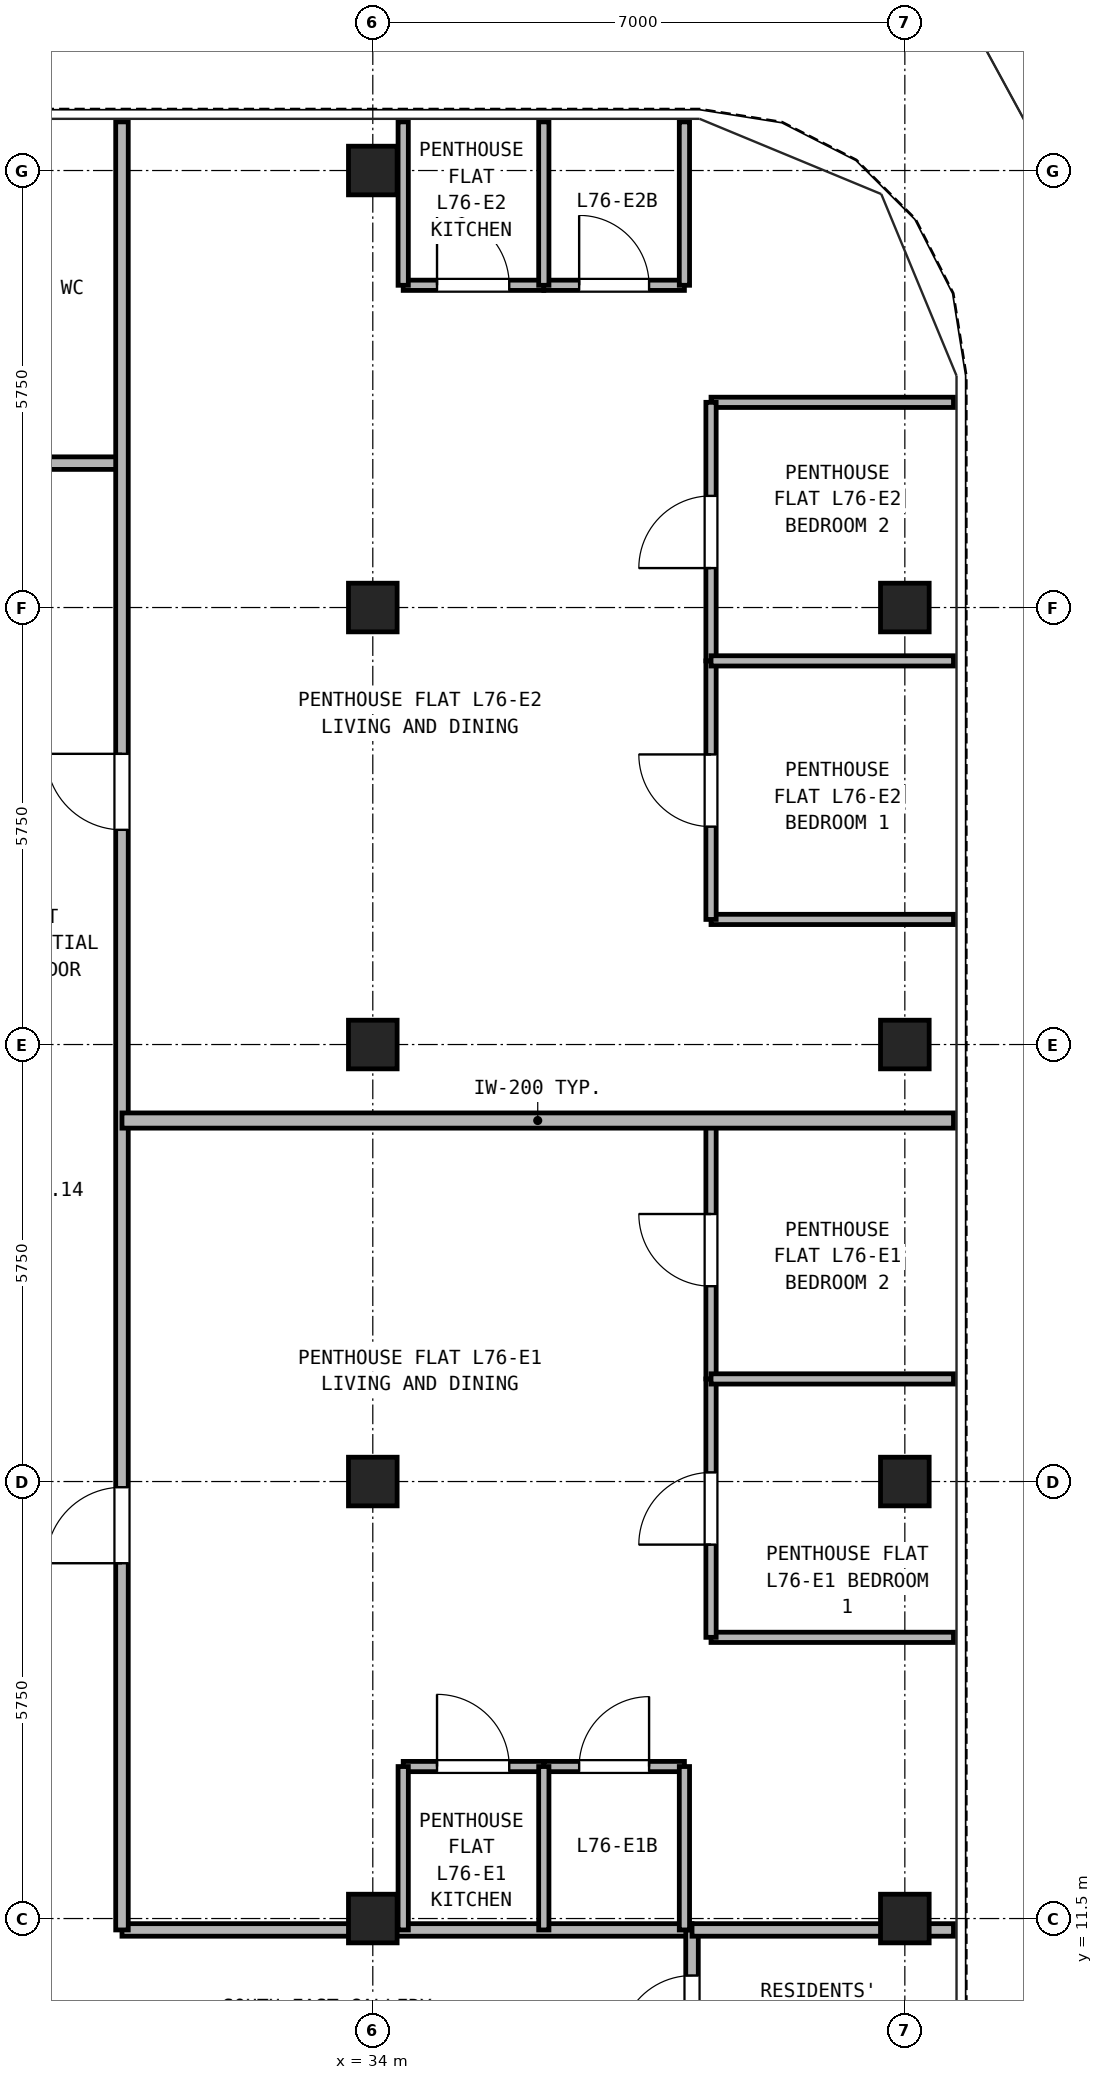
"""IFC4 building model, lengths in metres.
Left out: names, types, materials, properties, quantities, classifications, styles, units other than length and angle.
Written with IfcOpenShell. Run it as: python <this file> out.ifc"""

import sys

from ifc_helpers import new_model, si_unit, direction, frame, frame_2d, origin, origin_2d, place, context, subcontext, project, spatial, rectangle, hollow_rectangle, extrude, source, transform, mapped, element, fill, save


model = new_model("IFC4")
c1 = context("Model", 3, precision=1e-05, world=origin(), true_north=direction((0.0, 1.0)))
c2 = subcontext(c1, "Body", "Model", "MODEL_VIEW")
j1 = project(units=[si_unit("LENGTHUNIT", "METRE"), si_unit("PLANEANGLEUNIT", "RADIAN")], contexts=[c1])
p1 = place(None, origin())
s1 = spatial("IfcSite", under=j1, at=p1, CompositionType="ELEMENT")
p2 = place(p1, origin())
s2 = spatial("IfcBuilding", under=s1, at=p2, CompositionType="ELEMENT")
p3 = place(p2, frame((0.0, 0.0, 264.9)))
s3 = spatial("IfcBuildingStorey", under=s2, at=p3, CompositionType="ELEMENT", Elevation=264.9)
m1 = source(origin(), c2, "Body", "SweptSolid", [
    extrude(hollow_rectangle(XDim=0.64, YDim=0.64, WallThickness=0.035, at=origin_2d()), origin(), (0.0, 0.0, 1.0), 2.98),
])
for number, where, z_axis, x_axis in (
    (1, (34.0, 34.5, 0.0), (0.0, 0.0, 1.0), (1.0, 0.0, 0.0)),
    (2, (41.0, 11.5, 0.0), (0.0, 0.0, 1.0), (1.0, 0.0, 0.0)),
    (3, (41.0, 17.25, 0.0), (0.0, 0.0, 1.0), (1.0, 0.0, 0.0)),
    (4, (41.0, 23.0, 0.0), (0.0, 0.0, 1.0), (1.0, 0.0, 0.0)),
    (5, (41.0, 28.75, 0.0), (0.0, 0.0, 1.0), (1.0, 0.0, 0.0)),
    (6, (34.0, 11.5, 0.0), (0.0, 0.0, 1.0), (1.0, 0.0, 0.0)),
    (7, (34.0, 17.25, 0.0), (0.0, 0.0, 1.0), (1.0, 0.0, 0.0)),
    (8, (34.0, 23.0, 0.0), (0.0, 0.0, 1.0), (1.0, 0.0, 0.0)),
    (9, (34.0, 28.75, 0.0), (0.0, 0.0, 1.0), (1.0, 0.0, 0.0)),
):
    element("IfcColumn", number, at=place(p3, frame(where, z_axis=z_axis, x_axis=x_axis)), inside=s3, PredefinedType="COLUMN", context=c2, shape_type="MappedRepresentation", body=[
        mapped(m1, transform((0.0, 0.0, 0.0), x_axis=(1.0, 0.0, 0.0), y_axis=(0.0, 1.0, 0.0), z_axis=(0.0, 0.0, 1.0), scale=1.0)),
    ])
p4 = place(p3, frame((30.7, 11.35, 0.0), z_axis=(0.0, 0.0, 1.0), x_axis=(1.0, 0.0, 0.0)))
e10 = element("IfcWall", 10, at=p4, inside=s3, PredefinedType="PARTITIONING", context=c2, shape_type="SweptSolid", body=[
    extrude(rectangle(XDim=7.5, YDim=0.165, at=frame_2d((3.75, 0.0))), origin(), (0.0, 0.0, 1.0), 2.428),
])
p5 = place(p3, frame((38.2, 9.35, 0.0), z_axis=(0.0, 0.0, 1.0), x_axis=(0.0, 1.0, 0.0)))
e11 = element("IfcWall", 11, at=p5, inside=s3, PredefinedType="PARTITIONING", context=c2, shape_type="SweptSolid", body=[
    extrude(rectangle(XDim=2.0, YDim=0.165, at=frame_2d((1.0, 0.0))), origin(), (0.0, 0.0, 1.0), 2.98),
])
p6 = place(p5, frame((0.45, 0.0, 0.0)))
e12 = element("IfcOpeningElement", 12, at=p6, cuts=e11, PredefinedType="OPENING", context=c2, shape_type="SweptSolid", body=[
    extrude(rectangle(XDim=0.95, YDim=2.15, at=frame_2d((0.475, 1.075))), frame((0.0, 0.093, 0.0), z_axis=(0.0, -1.0, 0.0), x_axis=(1.0, 0.0, 0.0)), (0.0, 0.0, 1.0), 0.185),
])
p7 = place(p3, frame((16.3, 30.65, 0.0), z_axis=(0.0, 0.0, 1.0), x_axis=(1.0, 0.0, 0.0)))
e13 = element("IfcWall", 13, at=p7, inside=s3, PredefinedType="PARTITIONING", context=c2, shape_type="SweptSolid", body=[
    extrude(rectangle(XDim=14.4, YDim=0.165, at=frame_2d((7.2, 0.0))), origin(), (0.0, 0.0, 1.0), 2.98),
])
p8 = place(p7, frame((3.1, 0.0, 0.0)))
e14 = element("IfcOpeningElement", 14, at=p8, cuts=e13, PredefinedType="OPENING", context=c2, shape_type="SweptSolid", body=[
    extrude(rectangle(XDim=0.95, YDim=2.15, at=frame_2d((0.475, 1.075))), frame((0.0, 0.093, 0.0), z_axis=(0.0, -1.0, 0.0), x_axis=(1.0, 0.0, 0.0)), (0.0, 0.0, 1.0), 0.185),
])
p9 = place(p7, frame((8.0, 0.0, 0.0)))
e15 = element("IfcOpeningElement", 15, at=p9, cuts=e13, PredefinedType="OPENING", context=c2, shape_type="SweptSolid", body=[
    extrude(rectangle(XDim=0.95, YDim=2.15, at=frame_2d((0.475, 1.075))), frame((0.0, 0.093, 0.0), z_axis=(0.0, -1.0, 0.0), x_axis=(1.0, 0.0, 0.0)), (0.0, 0.0, 1.0), 0.185),
])
p10 = place(p7, frame((11.6, 0.0, 0.0)))
e16 = element("IfcOpeningElement", 16, at=p10, cuts=e13, PredefinedType="OPENING", context=c2, shape_type="SweptSolid", body=[
    extrude(rectangle(XDim=0.92, YDim=2.1, at=frame_2d((0.46, 1.05))), frame((0.0, 0.093, 0.0), z_axis=(0.0, -1.0, 0.0), x_axis=(1.0, 0.0, 0.0)), (0.0, 0.0, 1.0), 0.185),
])
p11 = place(p3, frame((30.7, 11.35, 0.0), z_axis=(0.0, 0.0, 1.0), x_axis=(0.0, 1.0, 0.0)))
e17 = element("IfcWall", 17, at=p11, inside=s3, PredefinedType="PARTITIONING", context=c2, shape_type="SweptSolid", body=[
    extrude(rectangle(XDim=23.79, YDim=0.165, at=frame_2d((11.895, 0.0))), origin(), (0.0, 0.0, 1.0), 2.98),
])
p12 = place(p11, frame((4.825, 0.0, 0.0)))
e18 = element("IfcOpeningElement", 18, at=p12, cuts=e17, PredefinedType="OPENING", context=c2, shape_type="SweptSolid", body=[
    extrude(rectangle(XDim=1.0, YDim=2.15, at=frame_2d((0.5, 1.075))), frame((0.0, 0.093, 0.0), z_axis=(0.0, -1.0, 0.0), x_axis=(1.0, 0.0, 0.0)), (0.0, 0.0, 1.0), 0.185),
])
p13 = place(p11, frame((14.475, 0.0, 0.0)))
e19 = element("IfcOpeningElement", 19, at=p13, cuts=e17, PredefinedType="OPENING", context=c2, shape_type="SweptSolid", body=[
    extrude(rectangle(XDim=1.0, YDim=2.15, at=frame_2d((0.5, 1.075))), frame((0.0, 0.093, 0.0), z_axis=(0.0, -1.0, 0.0), x_axis=(1.0, 0.0, 0.0)), (0.0, 0.0, 1.0), 0.185),
])
p14 = place(p3, frame((38.2, 11.35, 0.0), z_axis=(0.0, 0.0, 1.0), x_axis=(1.0, 0.0, 0.0)))
e20 = element("IfcWall", 20, at=p14, inside=s3, PredefinedType="PARTITIONING", context=c2, shape_type="SweptSolid", body=[
    extrude(rectangle(XDim=3.44, YDim=0.165, at=frame_2d((1.72, 0.0))), origin(), (0.0, 0.0, 1.0), 2.428),
])
p15 = place(p3, frame((34.4, 13.5, 0.0), z_axis=(0.0, 0.0, 1.0), x_axis=(1.0, 0.0, 0.0)))
e21 = element("IfcWall", 21, at=p15, inside=s3, PredefinedType="PARTITIONING", context=c2, shape_type="SweptSolid", body=[
    extrude(rectangle(XDim=1.85, YDim=0.135, at=frame_2d((0.925, 0.0))), origin(), (0.0, 0.0, 1.0), 2.98),
])
p16 = place(p15, frame((0.445, 0.0, 0.0)))
e22 = element("IfcOpeningElement", 22, at=p16, cuts=e21, PredefinedType="OPENING", context=c2, shape_type="SweptSolid", body=[
    extrude(rectangle(XDim=0.95, YDim=2.15, at=frame_2d((0.475, 1.075))), frame((0.0, 0.077, 0.0), z_axis=(0.0, -1.0, 0.0), x_axis=(1.0, 0.0, 0.0)), (0.0, 0.0, 1.0), 0.155),
])
p17 = place(p3, frame((36.25, 13.5, 0.0), z_axis=(0.0, 0.0, 1.0), x_axis=(1.0, 0.0, 0.0)))
e23 = element("IfcWall", 23, at=p17, inside=s3, PredefinedType="PARTITIONING", context=c2, shape_type="SweptSolid", body=[
    extrude(rectangle(XDim=1.85, YDim=0.135, at=frame_2d((0.925, 0.0))), origin(), (0.0, 0.0, 1.0), 2.98),
])
p18 = place(p17, frame((0.465, 0.0, 0.0)))
e24 = element("IfcOpeningElement", 24, at=p18, cuts=e23, PredefinedType="OPENING", context=c2, shape_type="SweptSolid", body=[
    extrude(rectangle(XDim=0.92, YDim=2.1, at=frame_2d((0.46, 1.05))), frame((0.0, 0.077, 0.0), z_axis=(0.0, -1.0, 0.0), x_axis=(1.0, 0.0, 0.0)), (0.0, 0.0, 1.0), 0.155),
])
for number, where, z_axis, x_axis in (
    (25, (34.4, 11.35, 0.0), (0.0, 0.0, 1.0), (0.0, 1.0, 0.0)),
    (26, (36.25, 11.35, 0.0), (0.0, 0.0, 1.0), (0.0, 1.0, 0.0)),
    (27, (38.1, 11.35, 0.0), (0.0, 0.0, 1.0), (0.0, 1.0, 0.0)),
):
    element("IfcWall", number, at=place(p3, frame(where, z_axis=z_axis, x_axis=x_axis)), inside=s3, PredefinedType="PARTITIONING", context=c2, shape_type="SweptSolid", body=[
        extrude(rectangle(XDim=2.15, YDim=0.135, at=frame_2d((1.075, 0.0))), origin(), (0.0, 0.0, 1.0), 2.98),
    ])
p19 = place(p3, frame((38.45, 15.2, 0.0), z_axis=(0.0, 0.0, 1.0), x_axis=(1.0, 0.0, 0.0)))
e28 = element("IfcWall", 28, at=p19, inside=s3, PredefinedType="PARTITIONING", context=c2, shape_type="SweptSolid", body=[
    extrude(rectangle(XDim=3.19, YDim=0.135, at=frame_2d((1.595, 0.0))), origin(), (0.0, 0.0, 1.0), 2.98),
])
p20 = place(p3, frame((38.45, 15.2, 0.0), z_axis=(0.0, 0.0, 1.0), x_axis=(0.0, 1.0, 0.0)))
e29 = element("IfcWall", 29, at=p20, inside=s3, PredefinedType="PARTITIONING", context=c2, shape_type="SweptSolid", body=[
    extrude(rectangle(XDim=3.4, YDim=0.135, at=frame_2d((1.7, 0.0))), origin(), (0.0, 0.0, 1.0), 2.98),
])
p21 = place(p20, frame((1.22, 0.0, 0.0)))
e30 = element("IfcOpeningElement", 30, at=p21, cuts=e29, PredefinedType="OPENING", context=c2, shape_type="SweptSolid", body=[
    extrude(rectangle(XDim=0.95, YDim=2.15, at=frame_2d((0.475, 1.075))), frame((0.0, 0.077, 0.0), z_axis=(0.0, -1.0, 0.0), x_axis=(1.0, 0.0, 0.0)), (0.0, 0.0, 1.0), 0.155),
])
p22 = place(p3, frame((38.45, 18.6, 0.0), z_axis=(0.0, 0.0, 1.0), x_axis=(0.0, 1.0, 0.0)))
e31 = element("IfcWall", 31, at=p22, inside=s3, PredefinedType="PARTITIONING", context=c2, shape_type="SweptSolid", body=[
    extrude(rectangle(XDim=3.4, YDim=0.135, at=frame_2d((1.7, 0.0))), origin(), (0.0, 0.0, 1.0), 2.98),
])
p23 = place(p22, frame((1.22, 0.0, 0.0)))
e32 = element("IfcOpeningElement", 32, at=p23, cuts=e31, PredefinedType="OPENING", context=c2, shape_type="SweptSolid", body=[
    extrude(rectangle(XDim=0.95, YDim=2.15, at=frame_2d((0.475, 1.075))), frame((0.0, 0.077, 0.0), z_axis=(0.0, -1.0, 0.0), x_axis=(1.0, 0.0, 0.0)), (0.0, 0.0, 1.0), 0.155),
])
p24 = place(p3, frame((38.45, 18.6, 0.0), z_axis=(0.0, 0.0, 1.0), x_axis=(1.0, 0.0, 0.0)))
e33 = element("IfcWall", 33, at=p24, inside=s3, PredefinedType="PARTITIONING", context=c2, shape_type="SweptSolid", body=[
    extrude(rectangle(XDim=3.19, YDim=0.135, at=frame_2d((1.595, 0.0))), origin(), (0.0, 0.0, 1.0), 2.98),
])
p25 = place(p3, frame((30.7, 22.0, 0.0), z_axis=(0.0, 0.0, 1.0), x_axis=(1.0, 0.0, 0.0)))
e34 = element("IfcWall", 34, at=p25, inside=s3, PredefinedType="PARTITIONING", context=c2, shape_type="SweptSolid", body=[
    extrude(rectangle(XDim=10.94, YDim=0.2, at=frame_2d((5.47, 0.0))), origin(), (0.0, 0.0, 1.0), 2.98),
])
p26 = place(p3, frame((34.4, 32.99, 0.0), z_axis=(0.0, 0.0, 1.0), x_axis=(1.0, 0.0, 0.0)))
e35 = element("IfcWall", 35, at=p26, inside=s3, PredefinedType="PARTITIONING", context=c2, shape_type="SweptSolid", body=[
    extrude(rectangle(XDim=1.85, YDim=0.135, at=frame_2d((0.925, 0.0))), origin(), (0.0, 0.0, 1.0), 2.98),
])
p27 = place(p26, frame((0.445, 0.0, 0.0)))
e36 = element("IfcOpeningElement", 36, at=p27, cuts=e35, PredefinedType="OPENING", context=c2, shape_type="SweptSolid", body=[
    extrude(rectangle(XDim=0.95, YDim=2.15, at=frame_2d((0.475, 1.075))), frame((0.0, 0.077, 0.0), z_axis=(0.0, -1.0, 0.0), x_axis=(1.0, 0.0, 0.0)), (0.0, 0.0, 1.0), 0.155),
])
p28 = place(p3, frame((36.25, 32.99, 0.0), z_axis=(0.0, 0.0, 1.0), x_axis=(1.0, 0.0, 0.0)))
e37 = element("IfcWall", 37, at=p28, inside=s3, PredefinedType="PARTITIONING", context=c2, shape_type="SweptSolid", body=[
    extrude(rectangle(XDim=1.85, YDim=0.135, at=frame_2d((0.925, 0.0))), origin(), (0.0, 0.0, 1.0), 2.98),
])
p29 = place(p28, frame((0.465, 0.0, 0.0)))
e38 = element("IfcOpeningElement", 38, at=p29, cuts=e37, PredefinedType="OPENING", context=c2, shape_type="SweptSolid", body=[
    extrude(rectangle(XDim=0.92, YDim=2.1, at=frame_2d((0.46, 1.05))), frame((0.0, 0.077, 0.0), z_axis=(0.0, -1.0, 0.0), x_axis=(1.0, 0.0, 0.0)), (0.0, 0.0, 1.0), 0.155),
])
for number, where, z_axis, x_axis in (
    (39, (34.4, 32.99, 0.0), (0.0, 0.0, 1.0), (0.0, 1.0, 0.0)),
    (40, (36.25, 32.99, 0.0), (0.0, 0.0, 1.0), (0.0, 1.0, 0.0)),
    (41, (38.1, 32.99, 0.0), (0.0, 0.0, 1.0), (0.0, 1.0, 0.0)),
):
    element("IfcWall", number, at=place(p3, frame(where, z_axis=z_axis, x_axis=x_axis)), inside=s3, PredefinedType="PARTITIONING", context=c2, shape_type="SweptSolid", body=[
        extrude(rectangle(XDim=2.15, YDim=0.135, at=frame_2d((1.075, 0.0))), origin(), (0.0, 0.0, 1.0), 2.98),
    ])
for number, where, z_axis, x_axis in (
    (42, (38.45, 24.646, 0.0), (0.0, 0.0, 1.0), (1.0, 0.0, 0.0)),
    (43, (38.45, 31.45, 0.0), (0.0, 0.0, 1.0), (1.0, 0.0, 0.0)),
):
    element("IfcWall", number, at=place(p3, frame(where, z_axis=z_axis, x_axis=x_axis)), inside=s3, PredefinedType="PARTITIONING", context=c2, shape_type="SweptSolid", body=[
        extrude(rectangle(XDim=3.19, YDim=0.135, at=frame_2d((1.595, 0.0))), origin(), (0.0, 0.0, 1.0), 2.98),
    ])
p30 = place(p3, frame((38.45, 24.646, 0.0), z_axis=(0.0, 0.0, 1.0), x_axis=(0.0, 1.0, 0.0)))
e44 = element("IfcWall", 44, at=p30, inside=s3, PredefinedType="PARTITIONING", context=c2, shape_type="SweptSolid", body=[
    extrude(rectangle(XDim=3.402, YDim=0.135, at=frame_2d((1.701, 0.0))), origin(), (0.0, 0.0, 1.0), 2.98),
])
p31 = place(p30, frame((1.221, 0.0, 0.0)))
e45 = element("IfcOpeningElement", 45, at=p31, cuts=e44, PredefinedType="OPENING", context=c2, shape_type="SweptSolid", body=[
    extrude(rectangle(XDim=0.95, YDim=2.15, at=frame_2d((0.475, 1.075))), frame((0.0, 0.077, 0.0), z_axis=(0.0, -1.0, 0.0), x_axis=(1.0, 0.0, 0.0)), (0.0, 0.0, 1.0), 0.155),
])
p32 = place(p3, frame((38.45, 28.048, 0.0), z_axis=(0.0, 0.0, 1.0), x_axis=(0.0, 1.0, 0.0)))
e46 = element("IfcWall", 46, at=p32, inside=s3, PredefinedType="PARTITIONING", context=c2, shape_type="SweptSolid", body=[
    extrude(rectangle(XDim=3.402, YDim=0.135, at=frame_2d((1.701, 0.0))), origin(), (0.0, 0.0, 1.0), 2.98),
])
p33 = place(p32, frame((1.221, 0.0, 0.0)))
e47 = element("IfcOpeningElement", 47, at=p33, cuts=e46, PredefinedType="OPENING", context=c2, shape_type="SweptSolid", body=[
    extrude(rectangle(XDim=0.95, YDim=2.15, at=frame_2d((0.475, 1.075))), frame((0.0, 0.077, 0.0), z_axis=(0.0, -1.0, 0.0), x_axis=(1.0, 0.0, 0.0)), (0.0, 0.0, 1.0), 0.155),
])
p34 = place(p3, frame((38.45, 28.048, 0.0), z_axis=(0.0, 0.0, 1.0), x_axis=(1.0, 0.0, 0.0)))
e48 = element("IfcWall", 48, at=p34, inside=s3, PredefinedType="PARTITIONING", context=c2, shape_type="SweptSolid", body=[
    extrude(rectangle(XDim=3.19, YDim=0.135, at=frame_2d((1.595, 0.0))), origin(), (0.0, 0.0, 1.0), 2.98),
])
p35 = place(p6, origin())
e49 = element("IfcDoor", 49, at=p35, inside=s3, OperationType="SINGLE_SWING_LEFT", PredefinedType="DOOR", context=c2, shape_type="SweptSolid", body=[
    extrude(rectangle(XDim=0.95, YDim=2.15, at=frame_2d((0.475, 1.075))), frame((0.0, 0.025, 0.0), z_axis=(0.0, -1.0, 0.0), x_axis=(1.0, 0.0, 0.0)), (0.0, 0.0, 1.0), 0.05),
])
fill(e12, e49)
p36 = place(p16, origin())
e50 = element("IfcDoor", 50, at=p36, inside=s3, OperationType="SINGLE_SWING_LEFT", PredefinedType="DOOR", context=c2, shape_type="SweptSolid", body=[
    extrude(rectangle(XDim=0.95, YDim=2.15, at=frame_2d((0.475, 1.075))), frame((0.0, 0.025, 0.0), z_axis=(0.0, -1.0, 0.0), x_axis=(1.0, 0.0, 0.0)), (0.0, 0.0, 1.0), 0.05),
])
fill(e22, e50)
p37 = place(p18, origin())
e51 = element("IfcDoor", 51, at=p37, inside=s3, OperationType="SINGLE_SWING_RIGHT", PredefinedType="DOOR", context=c2, shape_type="SweptSolid", body=[
    extrude(rectangle(XDim=0.92, YDim=2.1, at=frame_2d((0.46, 1.05))), frame((0.0, 0.025, 0.0), z_axis=(0.0, -1.0, 0.0), x_axis=(1.0, 0.0, 0.0)), (0.0, 0.0, 1.0), 0.05),
])
fill(e24, e51)
p38 = place(p21, frame((0.95, 0.0, 0.0), z_axis=(0.0, 0.0, 1.0), x_axis=(-1.0, 0.0, 0.0)))
e52 = element("IfcDoor", 52, at=p38, inside=s3, OperationType="SINGLE_SWING_LEFT", PredefinedType="DOOR", context=c2, shape_type="SweptSolid", body=[
    extrude(rectangle(XDim=0.95, YDim=2.15, at=frame_2d((0.475, 1.075))), frame((0.0, 0.025, 0.0), z_axis=(0.0, -1.0, 0.0), x_axis=(1.0, 0.0, 0.0)), (0.0, 0.0, 1.0), 0.05),
])
fill(e30, e52)
p39 = place(p23, frame((0.95, 0.0, 0.0), z_axis=(0.0, 0.0, 1.0), x_axis=(-1.0, 0.0, 0.0)))
e53 = element("IfcDoor", 53, at=p39, inside=s3, OperationType="SINGLE_SWING_RIGHT", PredefinedType="DOOR", context=c2, shape_type="SweptSolid", body=[
    extrude(rectangle(XDim=0.95, YDim=2.15, at=frame_2d((0.475, 1.075))), frame((0.0, 0.025, 0.0), z_axis=(0.0, -1.0, 0.0), x_axis=(1.0, 0.0, 0.0)), (0.0, 0.0, 1.0), 0.05),
])
fill(e32, e53)
p40 = place(p12, frame((1.0, 0.0, 0.0), z_axis=(0.0, 0.0, 1.0), x_axis=(-1.0, 0.0, 0.0)))
e54 = element("IfcDoor", 54, at=p40, inside=s3, OperationType="SINGLE_SWING_LEFT", PredefinedType="DOOR", context=c2, shape_type="SweptSolid", body=[
    extrude(rectangle(XDim=1.0, YDim=2.15, at=frame_2d((0.5, 1.075))), frame((0.0, 0.025, 0.0), z_axis=(0.0, -1.0, 0.0), x_axis=(1.0, 0.0, 0.0)), (0.0, 0.0, 1.0), 0.05),
])
fill(e18, e54)
p41 = place(p27, frame((0.95, 0.0, 0.0), z_axis=(0.0, 0.0, 1.0), x_axis=(-1.0, 0.0, 0.0)))
e55 = element("IfcDoor", 55, at=p41, inside=s3, OperationType="SINGLE_SWING_LEFT", PredefinedType="DOOR", context=c2, shape_type="SweptSolid", body=[
    extrude(rectangle(XDim=0.95, YDim=2.15, at=frame_2d((0.475, 1.075))), frame((0.0, 0.025, 0.0), z_axis=(0.0, -1.0, 0.0), x_axis=(1.0, 0.0, 0.0)), (0.0, 0.0, 1.0), 0.05),
])
fill(e36, e55)
p42 = place(p29, frame((0.92, 0.0, 0.0), z_axis=(0.0, 0.0, 1.0), x_axis=(-1.0, 0.0, 0.0)))
e56 = element("IfcDoor", 56, at=p42, inside=s3, OperationType="SINGLE_SWING_LEFT", PredefinedType="DOOR", context=c2, shape_type="SweptSolid", body=[
    extrude(rectangle(XDim=0.92, YDim=2.1, at=frame_2d((0.46, 1.05))), frame((0.0, 0.025, 0.0), z_axis=(0.0, -1.0, 0.0), x_axis=(1.0, 0.0, 0.0)), (0.0, 0.0, 1.0), 0.05),
])
fill(e38, e56)
p43 = place(p31, frame((0.95, 0.0, 0.0), z_axis=(0.0, 0.0, 1.0), x_axis=(-1.0, 0.0, 0.0)))
e57 = element("IfcDoor", 57, at=p43, inside=s3, OperationType="SINGLE_SWING_RIGHT", PredefinedType="DOOR", context=c2, shape_type="SweptSolid", body=[
    extrude(rectangle(XDim=0.95, YDim=2.15, at=frame_2d((0.475, 1.075))), frame((0.0, 0.025, 0.0), z_axis=(0.0, -1.0, 0.0), x_axis=(1.0, 0.0, 0.0)), (0.0, 0.0, 1.0), 0.05),
])
fill(e45, e57)
p44 = place(p33, frame((0.95, 0.0, 0.0), z_axis=(0.0, 0.0, 1.0), x_axis=(-1.0, 0.0, 0.0)))
e58 = element("IfcDoor", 58, at=p44, inside=s3, OperationType="SINGLE_SWING_LEFT", PredefinedType="DOOR", context=c2, shape_type="SweptSolid", body=[
    extrude(rectangle(XDim=0.95, YDim=2.15, at=frame_2d((0.475, 1.075))), frame((0.0, 0.025, 0.0), z_axis=(0.0, -1.0, 0.0), x_axis=(1.0, 0.0, 0.0)), (0.0, 0.0, 1.0), 0.05),
])
fill(e47, e58)
p45 = place(p13, frame((1.0, 0.0, 0.0), z_axis=(0.0, 0.0, 1.0), x_axis=(-1.0, 0.0, 0.0)))
e59 = element("IfcDoor", 59, at=p45, inside=s3, OperationType="SINGLE_SWING_RIGHT", PredefinedType="DOOR", context=c2, shape_type="SweptSolid", body=[
    extrude(rectangle(XDim=1.0, YDim=2.15, at=frame_2d((0.5, 1.075))), frame((0.0, 0.025, 0.0), z_axis=(0.0, -1.0, 0.0), x_axis=(1.0, 0.0, 0.0)), (0.0, 0.0, 1.0), 0.05),
])
fill(e19, e59)
save(model, sys.argv[1])
